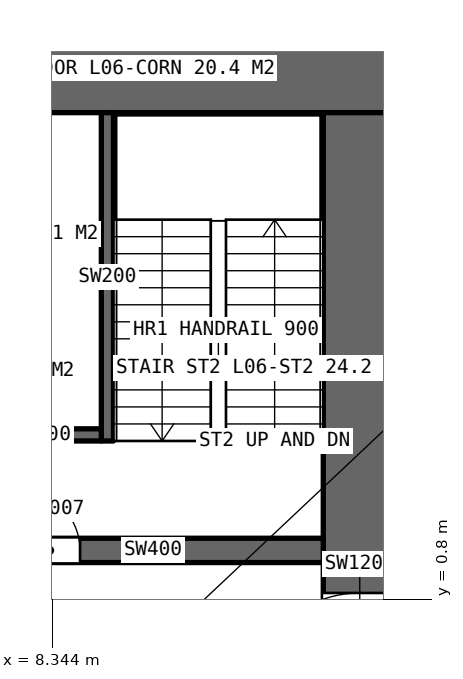
"""IFC4 building model, lengths in metres.
Left out: names, types, materials, properties, quantities, classifications, styles, units other than length and angle.
Written with IfcOpenShell. Run it as: python <this file> out.ifc"""

import sys

from ifc_helpers import new_model, si_unit, direction, frame, frame_2d, origin, place, context, subcontext, project, spatial, rectangle, extrude, element, fill, save


model = new_model("IFC4")
c1 = context("Model", 3, precision=1e-05, world=origin(), true_north=direction((0.0, 1.0)))
c2 = subcontext(c1, "Body", "Model", "MODEL_VIEW")
j1 = project(units=[si_unit("LENGTHUNIT", "METRE"), si_unit("PLANEANGLEUNIT", "RADIAN")], contexts=[c1])
p1 = place(None, origin())
s1 = spatial("IfcSite", under=j1, at=p1, CompositionType="ELEMENT")
p2 = place(p1, origin())
s2 = spatial("IfcBuilding", under=s1, at=p2, CompositionType="ELEMENT")
p3 = place(p2, frame((0.0, 0.0, 30.0)))
s3 = spatial("IfcBuildingStorey", under=s2, at=p3, CompositionType="ELEMENT", Elevation=30.0)
p4 = place(p3, frame((14.0, 9.4, 0.0), z_axis=(0.0, 0.0, 1.0), x_axis=(-1.0, 0.0, 0.0)))
e1 = element("IfcWall", 1, at=p4, inside=s3, PredefinedType="SHEAR", context=c2, shape_type="SweptSolid", body=[
    extrude(rectangle(XDim=28.0, YDim=1.2, at=frame_2d((14.0, 0.0))), origin(), (0.0, 0.0, 1.0), 5.0),
])
p5 = place(p4, frame((24.0, 0.0, 0.0)))
e2 = element("IfcOpeningElement", 2, at=p5, cuts=e1, PredefinedType="OPENING", context=c2, shape_type="SweptSolid", body=[
    extrude(rectangle(XDim=1.0, YDim=2.4, at=frame_2d((0.5, 1.2))), frame((0.0, 0.61, 0.0), z_axis=(0.0, -1.0, 0.0), x_axis=(1.0, 0.0, 0.0)), (0.0, 0.0, 1.0), 1.22),
])
p6 = place(p4, frame((13.1, 0.0, 0.0)))
e3 = element("IfcOpeningElement", 3, at=p6, cuts=e1, PredefinedType="OPENING", context=c2, shape_type="SweptSolid", body=[
    extrude(rectangle(XDim=1.8, YDim=2.4, at=frame_2d((0.9, 1.2))), frame((0.0, 0.61, 0.0), z_axis=(0.0, -1.0, 0.0), x_axis=(1.0, 0.0, 0.0)), (0.0, 0.0, 1.0), 1.22),
])
p7 = place(p3, frame((13.4, -8.8, 0.0), z_axis=(0.0, 0.0, 1.0), x_axis=(0.0, 1.0, 0.0)))
e4 = element("IfcWall", 4, at=p7, inside=s3, PredefinedType="SHEAR", context=c2, shape_type="SweptSolid", body=[
    extrude(rectangle(XDim=17.6, YDim=1.2, at=frame_2d((8.8, 0.0))), origin(), (0.0, 0.0, 1.0), 5.0),
])
p8 = place(p7, frame((7.9, 0.0, 0.0)))
e5 = element("IfcOpeningElement", 5, at=p8, cuts=e4, PredefinedType="OPENING", context=c2, shape_type="SweptSolid", body=[
    extrude(rectangle(XDim=1.8, YDim=2.4, at=frame_2d((0.9, 1.2))), frame((0.0, 0.61, 0.0), z_axis=(0.0, -1.0, 0.0), x_axis=(1.0, 0.0, 0.0)), (0.0, 0.0, 1.0), 1.22),
])
p9 = place(p3, frame((7.2, 1.6, 0.0), z_axis=(0.0, 0.0, 1.0), x_axis=(1.0, 0.0, 0.0)))
e6 = element("IfcWall", 6, at=p9, inside=s3, PredefinedType="SHEAR", context=c2, shape_type="SweptSolid", body=[
    extrude(rectangle(XDim=5.6, YDim=0.4, at=frame_2d((2.8, 0.0))), origin(), (0.0, 0.0, 1.0), 5.0),
])
p10 = place(p9, frame((0.6, 0.0, 0.0)))
e7 = element("IfcOpeningElement", 7, at=p10, cuts=e6, PredefinedType="OPENING", context=c2, shape_type="SweptSolid", body=[
    extrude(rectangle(XDim=1.0, YDim=2.4, at=frame_2d((0.5, 1.2))), frame((0.0, 0.21, 0.0), z_axis=(0.0, -1.0, 0.0), x_axis=(1.0, 0.0, 0.0)), (0.0, 0.0, 1.0), 0.42),
])
p11 = place(p3, frame((9.25, 3.4, 0.0), z_axis=(0.0, 0.0, 1.0), x_axis=(0.0, 1.0, 0.0)))
e8 = element("IfcWall", 8, at=p11, inside=s3, PredefinedType="SOLIDWALL", context=c2, shape_type="SweptSolid", body=[
    extrude(rectangle(XDim=5.4, YDim=0.2, at=frame_2d((2.7, 0.0))), origin(), (0.0, 0.0, 1.0), 5.0),
])
p12 = place(p3, frame((9.15, 3.5, 0.0), z_axis=(0.0, 0.0, 1.0), x_axis=(-1.0, 0.0, 0.0)))
e9 = element("IfcWall", 9, at=p12, inside=s3, PredefinedType="SOLIDWALL", context=c2, shape_type="SweptSolid", body=[
    extrude(rectangle(XDim=1.95, YDim=0.2, at=frame_2d((0.975, 0.0))), origin(), (0.0, 0.0, 1.0), 5.0),
])
p13 = place(p8, origin())
e10 = element("IfcDoor", 10, at=p13, inside=s3, OperationType="DOUBLE_DOOR_SINGLE_SWING", PredefinedType="DOOR", context=c2, shape_type="SweptSolid", body=[
    extrude(rectangle(XDim=1.8, YDim=2.4, at=frame_2d((0.9, 1.2))), frame((0.0, 0.025, 0.0), z_axis=(0.0, -1.0, 0.0), x_axis=(1.0, 0.0, 0.0)), (0.0, 0.0, 1.0), 0.05),
])
fill(e5, e10)
p14 = place(p10, origin())
e11 = element("IfcDoor", 11, at=p14, inside=s3, OperationType="SINGLE_SWING_LEFT", PredefinedType="DOOR", context=c2, shape_type="SweptSolid", body=[
    extrude(rectangle(XDim=1.0, YDim=2.4, at=frame_2d((0.5, 1.2))), frame((0.0, 0.025, 0.0), z_axis=(0.0, -1.0, 0.0), x_axis=(1.0, 0.0, 0.0)), (0.0, 0.0, 1.0), 0.05),
])
fill(e7, e11)
save(model, sys.argv[1])
